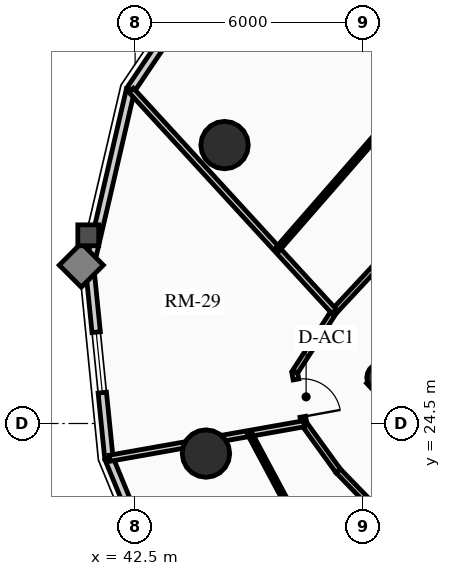
"""IFC4 building model, lengths in metres.
Left out: names, types, materials, properties, quantities, classifications, styles, units other than length and angle.
Written with IfcOpenShell. Run it as: python <this file> out.ifc"""

import sys

from ifc_helpers import new_model, si_unit, direction, frame, frame_2d, origin, origin_2d, place, context, subcontext, project, spatial, rectangle, circle, hollow_circle, extrude, source, transform, mapped, element, fill, save


model = new_model("IFC4")
c1 = context("Model", 3, precision=1e-05, world=origin(), true_north=direction((0.0, 1.0)))
c2 = subcontext(c1, "Body", "Model", "MODEL_VIEW")
j1 = project(units=[si_unit("LENGTHUNIT", "METRE"), si_unit("PLANEANGLEUNIT", "RADIAN")], contexts=[c1])
p1 = place(None, origin())
s1 = spatial("IfcSite", under=j1, at=p1, CompositionType="ELEMENT")
p2 = place(p1, origin())
s2 = spatial("IfcBuilding", under=s1, at=p2, CompositionType="ELEMENT")
p3 = place(p2, frame((0.0, 0.0, 160.33)))
s3 = spatial("IfcBuildingStorey", under=s2, at=p3, CompositionType="ELEMENT", Elevation=160.33)
p4 = place(p3, frame((58.702, 15.732, 0.0), z_axis=(0.0, 0.0, 1.0), x_axis=(-0.707106781187, 0.707106781187, 0.0)))
e1 = element("IfcWall", 1, at=p4, inside=s3, PredefinedType="SHEAR", context=c2, shape_type="SweptSolid", body=[
    extrude(rectangle(XDim=14.1, YDim=0.4, at=frame_2d((7.05, 0.0))), origin(), (0.0, 0.0, 1.0), 2.91),
])
p5 = place(p3, frame((48.873, 25.561, 0.0), z_axis=(0.0, 0.0, 1.0), x_axis=(0.707106781187, 0.707106781187, 0.0)))
e2 = element("IfcWall", 2, at=p5, inside=s3, PredefinedType="SHEAR", context=c2, shape_type="SweptSolid", body=[
    extrude(rectangle(XDim=10.7, YDim=0.4, at=frame_2d((5.35, 0.0))), origin(), (0.0, 0.0, 1.0), 2.91),
])
m1 = source(origin(), c2, "Body", "SweptSolid", [
    extrude(rectangle(XDim=1.5, YDim=2.02, at=frame_2d((0.75, 1.01))), frame((0.0, 0.21, 0.0), z_axis=(0.0, -1.0, 0.0), x_axis=(1.0, 0.0, 0.0)), (0.0, 0.0, 1.0), 0.42),
])
p6 = place(p5, frame((4.6, 0.0, 0.0)))
e3 = element("IfcOpeningElement", 3, at=p6, cuts=e2, PredefinedType="OPENING", context=c2, shape_type="MappedRepresentation", body=[
    mapped(m1, transform((0.0, 0.0, 0.0), x_axis=(1.0, 0.0, 0.0), y_axis=(0.0, 1.0, 0.0), z_axis=(0.0, 0.0, 1.0), scale=1.0)),
])
p7 = place(p3, frame((48.976, 25.706, 0.0), z_axis=(0.0, 0.0, 1.0), x_axis=(0.707106781187, 0.707106781187, 0.0)))
e4 = element("IfcColumn", 4, at=p7, inside=s3, PredefinedType="COLUMN", context=c2, shape_type="SweptSolid", body=[
    extrude(hollow_circle(Radius=0.38, WallThickness=0.032, at=origin_2d()), origin(), (0.0, 0.0, 1.0), 2.91),
])
for number, where, z_axis, x_axis in (
    (5, (44.854, 31.827, 0.0), (0.0, 0.0, 1.0), (1.0, 0.0, 0.0)),
    (6, (44.365, 23.709, 0.0), (0.0, 0.0, 1.0), (1.0, 0.0, 0.0)),
):
    element("IfcColumn", number, at=place(p3, frame(where, z_axis=z_axis, x_axis=x_axis)), inside=s3, PredefinedType="USERDEFINED", context=c2, shape_type="SweptSolid", body=[
        extrude(circle(Radius=0.625, at=origin_2d()), origin(), (0.0, 0.0, 1.0), 2.91),
    ])
p8 = place(p3, frame((42.378, 33.279, 0.0), z_axis=(0.0, 0.0, 1.0), x_axis=(0.559635286042, 0.828739009952, 0.0)))
e7 = element("IfcWall", 7, at=p8, inside=s3, PredefinedType="SOLIDWALL", context=c2, shape_type="SweptSolid", body=[
    extrude(rectangle(XDim=4.569, YDim=0.22, at=frame_2d((2.284, 0.0))), origin(), (0.0, 0.0, 1.0), 2.245),
])
m2 = source(origin(), c2, "Body", "SweptSolid", [
    extrude(rectangle(XDim=1.6, YDim=1.3, at=frame_2d((0.8, 0.65))), frame((0.0, 0.12, 0.0), z_axis=(0.0, -1.0, 0.0), x_axis=(1.0, 0.0, 0.0)), (0.0, 0.0, 1.0), 0.24),
])
p9 = place(p8, frame((1.484, 0.0, 0.65)))
e8 = element("IfcOpeningElement", 8, at=p9, cuts=e7, PredefinedType="OPENING", context=c2, shape_type="MappedRepresentation", body=[
    mapped(m2, transform((0.0, 0.0, 0.0), x_axis=(1.0, 0.0, 0.0), y_axis=(0.0, 1.0, 0.0), z_axis=(0.0, 0.0, 1.0), scale=1.0)),
])
p10 = place(p3, frame((41.302, 28.633, 0.0), z_axis=(0.0, 0.0, 1.0), x_axis=(0.225659540039, 0.974206226622, 0.0)))
e9 = element("IfcWall", 9, at=p10, inside=s3, PredefinedType="SOLIDWALL", context=c2, shape_type="SweptSolid", body=[
    extrude(rectangle(XDim=4.769, YDim=0.22, at=frame_2d((2.385, 0.0))), origin(), (0.0, 0.0, 1.0), 2.245),
])
p11 = place(p3, frame((41.811, 23.582, 0.0), z_axis=(0.0, 0.0, 1.0), x_axis=(-0.100279889424, 0.994959267396, 0.0)))
e10 = element("IfcWall", 10, at=p11, inside=s3, PredefinedType="SOLIDWALL", context=c2, shape_type="SweptSolid", body=[
    extrude(rectangle(XDim=5.076, YDim=0.22, at=frame_2d((2.538, 0.0))), origin(), (0.0, 0.0, 1.0), 2.245),
])
p12 = place(p11, frame((1.738, 0.0, 0.65)))
e11 = element("IfcOpeningElement", 11, at=p12, cuts=e10, PredefinedType="OPENING", context=c2, shape_type="MappedRepresentation", body=[
    mapped(m2, transform((0.0, 0.0, 0.0), x_axis=(1.0, 0.0, 0.0), y_axis=(0.0, 1.0, 0.0), z_axis=(0.0, 0.0, 1.0), scale=1.0)),
])
p13 = place(p3, frame((43.856, 18.622, 0.0), z_axis=(0.0, 0.0, 1.0), x_axis=(-0.38111364655, 0.924528197738, 0.0)))
e12 = element("IfcWall", 12, at=p13, inside=s3, PredefinedType="SOLIDWALL", context=c2, shape_type="SweptSolid", body=[
    extrude(rectangle(XDim=5.366, YDim=0.22, at=frame_2d((2.683, 0.0))), origin(), (0.0, 0.0, 1.0), 2.245),
])
p14 = place(p13, frame((1.883, 0.0, 0.65)))
e13 = element("IfcOpeningElement", 13, at=p14, cuts=e12, PredefinedType="OPENING", context=c2, shape_type="MappedRepresentation", body=[
    mapped(m2, transform((0.0, 0.0, 0.0), x_axis=(1.0, 0.0, 0.0), y_axis=(0.0, 1.0, 0.0), z_axis=(0.0, 0.0, 1.0), scale=1.0)),
])
p15 = place(p3, frame((52.135, 32.159, 0.0), z_axis=(0.0, 0.0, 1.0), x_axis=(-0.682546302454, -0.730842353047, 0.0)))
e14 = element("IfcWall", 14, at=p15, inside=s3, PredefinedType="PARTITIONING", context=c2, shape_type="SweptSolid", body=[
    extrude(rectangle(XDim=6.445, YDim=0.15, at=frame_2d((3.223, 0.0))), origin(), (0.0, 0.0, 1.0), 2.245),
])
p16 = place(p3, frame((47.736, 27.449, 0.0), z_axis=(0.0, 0.0, 1.0), x_axis=(-0.542589259408, -0.839998152126, 0.0)))
e15 = element("IfcWall", 15, at=p16, inside=s3, PredefinedType="PARTITIONING", context=c2, shape_type="SweptSolid", body=[
    extrude(rectangle(XDim=1.912, YDim=0.15, at=frame_2d((0.956, 0.0))), origin(), (0.0, 0.0, 1.0), 2.245),
])
p17 = place(p3, frame((46.699, 25.843, 0.0), z_axis=(0.0, 0.0, 1.0), x_axis=(0.180451258011, -0.983583928032, 0.0)))
e16 = element("IfcWall", 16, at=p17, inside=s3, PredefinedType="PARTITIONING", context=c2, shape_type="SweptSolid", body=[
    extrude(rectangle(XDim=1.372, YDim=0.15, at=frame_2d((0.686, 0.0))), origin(), (0.0, 0.0, 1.0), 2.245),
])
m3 = source(origin(), c2, "Body", "SweptSolid", [
    extrude(rectangle(XDim=1.0, YDim=2.015, at=frame_2d((0.5, 1.007))), frame((0.0, 0.085, 0.0), z_axis=(0.0, -1.0, 0.0), x_axis=(1.0, 0.0, 0.0)), (0.0, 0.0, 1.0), 0.17),
])
p18 = place(p17, frame((0.186, 0.0, 0.0)))
e17 = element("IfcOpeningElement", 17, at=p18, cuts=e16, PredefinedType="OPENING", context=c2, shape_type="MappedRepresentation", body=[
    mapped(m3, transform((0.0, 0.0, 0.0), x_axis=(1.0, 0.0, 0.0), y_axis=(0.0, 1.0, 0.0), z_axis=(0.0, 0.0, 1.0), scale=1.0)),
])
p19 = place(p3, frame((46.946, 24.494, 0.0), z_axis=(0.0, 0.0, 1.0), x_axis=(0.586340262528, -0.810064871809, 0.0)))
e18 = element("IfcWall", 18, at=p19, inside=s3, PredefinedType="PARTITIONING", context=c2, shape_type="SweptSolid", body=[
    extrude(rectangle(XDim=1.531, YDim=0.15, at=frame_2d((0.766, 0.0))), origin(), (0.0, 0.0, 1.0), 2.245),
])
p20 = place(p3, frame((47.844, 23.253, 0.0), z_axis=(0.0, 0.0, 1.0), x_axis=(0.696248411352, -0.717800912293, 0.0)))
e19 = element("IfcWall", 19, at=p20, inside=s3, PredefinedType="PARTITIONING", context=c2, shape_type="SweptSolid", body=[
    extrude(rectangle(XDim=5.947, YDim=0.15, at=frame_2d((2.974, 0.0))), origin(), (0.0, 0.0, 1.0), 2.675),
])
p21 = place(p3, frame((47.736, 27.449, 0.0), z_axis=(0.0, 0.0, 1.0), x_axis=(-0.676056254668, 0.736850012231, 0.0)))
e20 = element("IfcWall", 20, at=p21, inside=s3, PredefinedType="PARTITIONING", context=c2, shape_type="SweptSolid", body=[
    extrude(rectangle(XDim=7.899, YDim=0.16, at=frame_2d((3.95, 0.0))), origin(), (0.0, 0.0, 1.0), 2.245),
])
p22 = place(p3, frame((46.946, 24.494, 0.0), z_axis=(0.0, 0.0, 1.0), x_axis=(-0.984604227647, -0.174798497988, 0.0)))
e21 = element("IfcWall", 21, at=p22, inside=s3, PredefinedType="PARTITIONING", context=c2, shape_type="SweptSolid", body=[
    extrude(rectangle(XDim=5.196, YDim=0.16, at=frame_2d((2.598, 0.0))), origin(), (0.0, 0.0, 1.0), 2.245),
])
p23 = place(p3, frame((50.123, 33.529, 0.0), z_axis=(0.0, 0.0, 1.0), x_axis=(-0.657371249324, -0.753566878626, 0.0)))
e22 = element("IfcWall", 22, at=p23, inside=s3, PredefinedType="PARTITIONING", context=c2, shape_type="SweptSolid", body=[
    extrude(rectangle(XDim=5.906, YDim=0.125, at=frame_2d((2.953, 0.0))), origin(), (0.0, 0.0, 1.0), 2.245),
])
p24 = place(p3, frame((45.514, 24.239, 0.0), z_axis=(0.0, 0.0, 1.0), x_axis=(0.471225296528, -0.882012879674, 0.0)))
e23 = element("IfcWall", 23, at=p24, inside=s3, PredefinedType="PARTITIONING", context=c2, shape_type="SweptSolid", body=[
    extrude(rectangle(XDim=2.585, YDim=0.125, at=frame_2d((1.292, 0.0))), origin(), (0.0, 0.0, 1.0), 2.245),
])
m4 = source(origin(), c2, "Body", "SweptSolid", [
    extrude(rectangle(XDim=1.6, YDim=1.3, at=frame_2d((0.8, 0.65))), frame((0.0, 0.03, 0.0), z_axis=(0.0, -1.0, 0.0), x_axis=(1.0, 0.0, 0.0)), (0.0, 0.0, 1.0), 0.06),
])
p25 = place(p12, origin())
e24 = element("IfcWindow", 24, at=p25, inside=s3, PartitioningType="SINGLE_PANEL", PredefinedType="WINDOW", context=c2, shape_type="MappedRepresentation", body=[
    mapped(m4, transform((0.0, 0.0, 0.0), x_axis=(1.0, 0.0, 0.0), y_axis=(0.0, 1.0, 0.0), z_axis=(0.0, 0.0, 1.0), scale=1.0)),
])
fill(e11, e24)
m5 = source(origin(), c2, "Body", "SweptSolid", [
    extrude(rectangle(XDim=1.0, YDim=2.015, at=frame_2d((0.5, 1.007))), frame((0.0, 0.025, 0.0), z_axis=(0.0, -1.0, 0.0), x_axis=(1.0, 0.0, 0.0)), (0.0, 0.0, 1.0), 0.05),
])
p26 = place(p18, origin())
e25 = element("IfcDoor", 25, at=p26, inside=s3, OperationType="SINGLE_SWING_RIGHT", PredefinedType="DOOR", context=c2, shape_type="MappedRepresentation", body=[
    mapped(m5, transform((0.0, 0.0, 0.0), x_axis=(1.0, 0.0, 0.0), y_axis=(0.0, 1.0, 0.0), z_axis=(0.0, 0.0, 1.0), scale=1.0)),
])
fill(e17, e25)
save(model, sys.argv[1])
